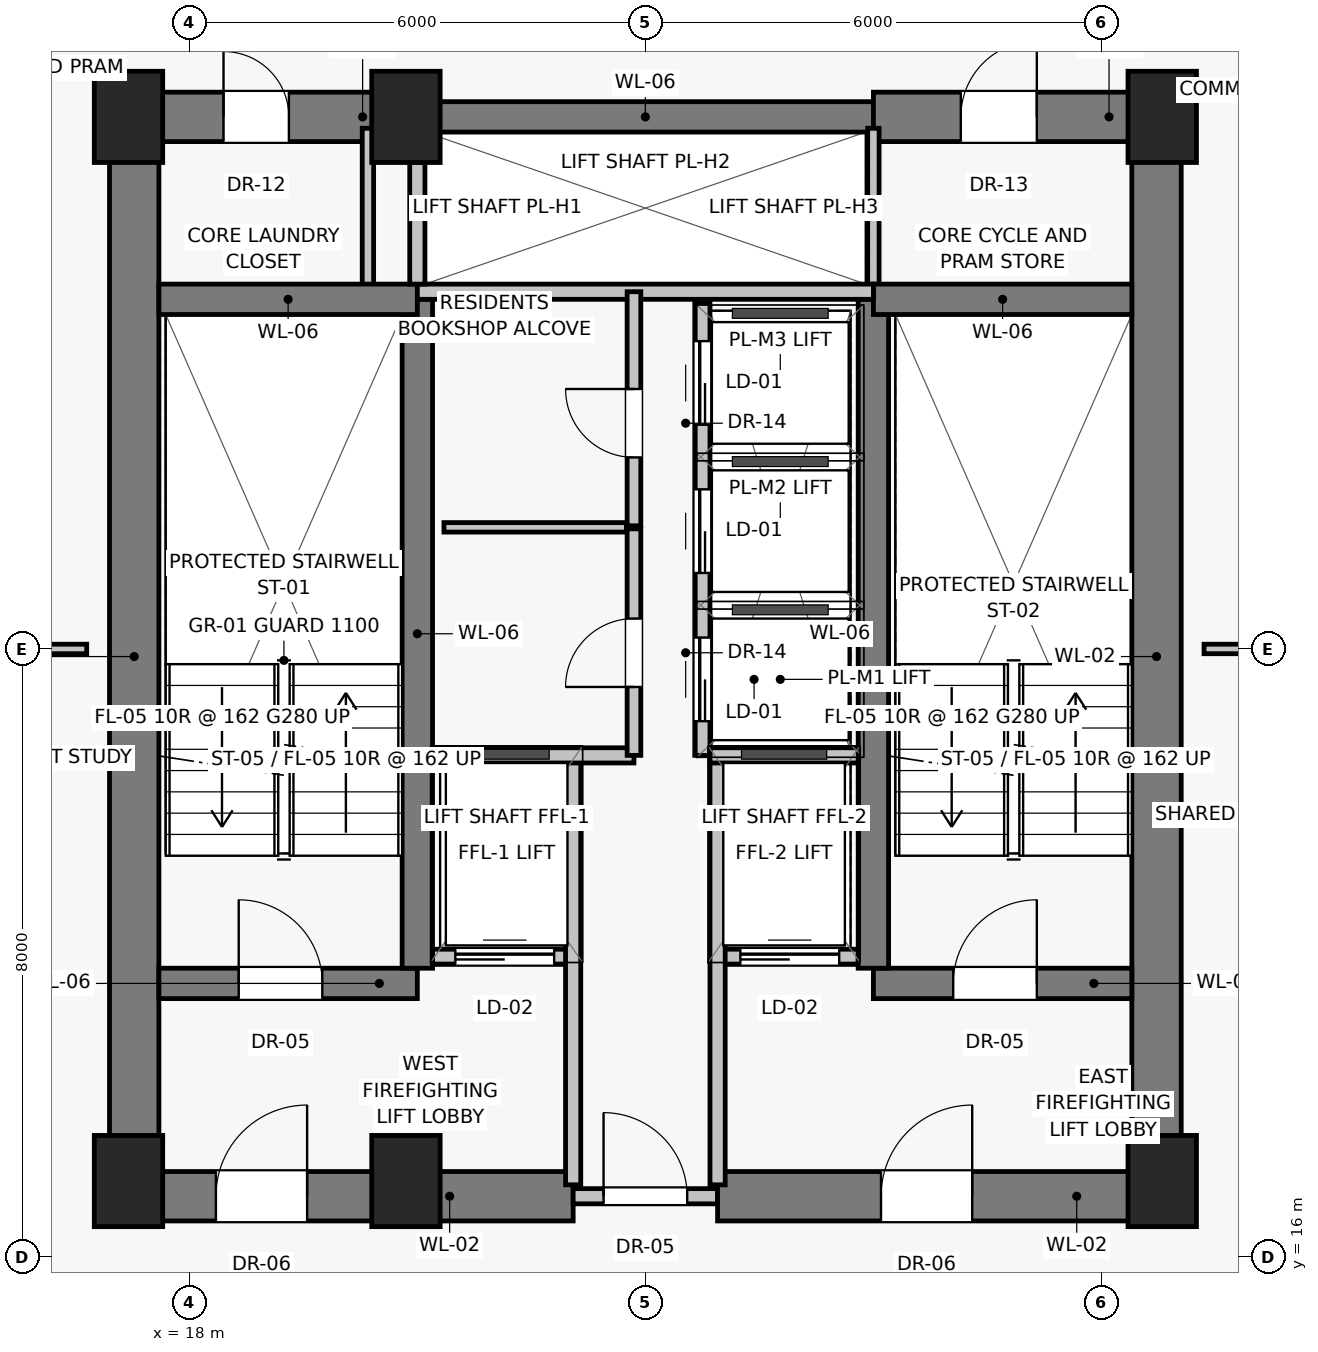
"""IFC4 building model, lengths in metres.
Left out: names, types, materials, properties, quantities, classifications, styles, units other than length and angle.
Written with IfcOpenShell. Run it as: python <this file> out.ifc"""

import sys

from ifc_helpers import new_model, si_unit, direction, frame, frame_2d, origin, origin_2d, place, context, subcontext, project, spatial, rectangle, extrude, source, transform, mapped, element, fill, save


model = new_model("IFC4")
c1 = context("Model", 3, precision=1e-05, world=origin(), true_north=direction((0.0, 1.0)))
c2 = subcontext(c1, "Body", "Model", "MODEL_VIEW")
j1 = project(units=[si_unit("LENGTHUNIT", "METRE"), si_unit("PLANEANGLEUNIT", "RADIAN")], contexts=[c1])
p1 = place(None, origin())
s1 = spatial("IfcSite", under=j1, at=p1, CompositionType="ELEMENT")
p2 = place(p1, origin())
s2 = spatial("IfcBuilding", under=s1, at=p2, CompositionType="ELEMENT")
p3 = place(p2, frame((0.0, 0.0, 132.75)))
s3 = spatial("IfcBuildingStorey", under=s2, at=p3, CompositionType="ELEMENT", Elevation=132.75)
for number, where, z_axis, x_axis in (
    (1, (17.2, 17.0, 0.0), (0.0, 0.0, 1.0), (1.0, 0.0, 0.0)),
    (2, (20.85, 17.0, 0.0), (0.0, 0.0, 1.0), (1.0, 0.0, 0.0)),
    (3, (30.8, 17.0, 0.0), (0.0, 0.0, 1.0), (1.0, 0.0, 0.0)),
    (4, (17.2, 31.0, 0.0), (0.0, 0.0, 1.0), (1.0, 0.0, 0.0)),
    (5, (20.85, 31.0, 0.0), (0.0, 0.0, 1.0), (1.0, 0.0, 0.0)),
    (6, (30.8, 31.0, 0.0), (0.0, 0.0, 1.0), (1.0, 0.0, 0.0)),
):
    element("IfcColumn", number, at=place(p3, frame(where, z_axis=z_axis, x_axis=x_axis)), inside=s3, PredefinedType="PILASTER", context=c2, shape_type="SweptSolid", body=[
        extrude(rectangle(XDim=0.9, YDim=1.2, at=origin_2d()), origin(), (0.0, 0.0, 1.0), 3.25),
    ])
for number, where, z_axis, x_axis in (
    (7, (17.275, 16.8, 0.0), (0.0, 0.0, 1.0), (0.0, 1.0, 0.0)),
    (8, (30.725, 16.8, 0.0), (0.0, 0.0, 1.0), (0.0, 1.0, 0.0)),
):
    element("IfcWall", number, at=place(p3, frame(where, z_axis=z_axis, x_axis=x_axis)), inside=s3, PredefinedType="SHEAR", context=c2, shape_type="SweptSolid", body=[
        extrude(rectangle(XDim=14.2, YDim=0.65, at=frame_2d((7.1, 0.0))), origin(), (0.0, 0.0, 1.0), 3.0),
    ])
p4 = place(p3, frame((17.2, 16.8, 0.0), z_axis=(0.0, 0.0, 1.0), x_axis=(1.0, 0.0, 0.0)))
e9 = element("IfcWall", 9, at=p4, inside=s3, PredefinedType="SHEAR", context=c2, shape_type="SweptSolid", body=[
    extrude(rectangle(XDim=5.85, YDim=0.65, at=frame_2d((2.925, 0.0))), origin(), (0.0, 0.0, 1.0), 3.0),
])
p5 = place(p4, frame((1.15, 0.0, 0.0)))
e10 = element("IfcOpeningElement", 10, at=p5, cuts=e9, PredefinedType="OPENING", context=c2, shape_type="SweptSolid", body=[
    extrude(rectangle(XDim=1.2, YDim=2.03, at=frame_2d((0.6, 1.015))), frame((0.0, 0.335, 0.0), z_axis=(0.0, -1.0, 0.0), x_axis=(1.0, 0.0, 0.0)), (0.0, 0.0, 1.0), 0.67),
])
p6 = place(p3, frame((23.05, 16.8, 0.0), z_axis=(0.0, 0.0, 1.0), x_axis=(1.0, 0.0, 0.0)))
e11 = element("IfcWall", 11, at=p6, inside=s3, PredefinedType="SOLIDWALL", context=c2, shape_type="SweptSolid", body=[
    extrude(rectangle(XDim=1.9, YDim=0.2, at=frame_2d((0.95, 0.0))), origin(), (0.0, 0.0, 1.0), 2.15),
])
p7 = place(p6, frame((0.4, 0.0, 0.0)))
e12 = element("IfcOpeningElement", 12, at=p7, cuts=e11, PredefinedType="OPENING", context=c2, shape_type="SweptSolid", body=[
    extrude(rectangle(XDim=1.1, YDim=2.03, at=frame_2d((0.55, 1.015))), frame((0.0, 0.11, 0.0), z_axis=(0.0, -1.0, 0.0), x_axis=(1.0, 0.0, 0.0)), (0.0, 0.0, 1.0), 0.22),
])
p8 = place(p3, frame((24.95, 16.8, 0.0), z_axis=(0.0, 0.0, 1.0), x_axis=(1.0, 0.0, 0.0)))
e13 = element("IfcWall", 13, at=p8, inside=s3, PredefinedType="SHEAR", context=c2, shape_type="SweptSolid", body=[
    extrude(rectangle(XDim=5.85, YDim=0.65, at=frame_2d((2.925, 0.0))), origin(), (0.0, 0.0, 1.0), 3.0),
])
p9 = place(p8, frame((2.15, 0.0, 0.0)))
e14 = element("IfcOpeningElement", 14, at=p9, cuts=e13, PredefinedType="OPENING", context=c2, shape_type="SweptSolid", body=[
    extrude(rectangle(XDim=1.2, YDim=2.03, at=frame_2d((0.6, 1.015))), frame((0.0, 0.335, 0.0), z_axis=(0.0, -1.0, 0.0), x_axis=(1.0, 0.0, 0.0)), (0.0, 0.0, 1.0), 0.67),
])
p10 = place(p3, frame((17.2, 31.0, 0.0), z_axis=(0.0, 0.0, 1.0), x_axis=(1.0, 0.0, 0.0)))
e15 = element("IfcWall", 15, at=p10, inside=s3, PredefinedType="SHEAR", context=c2, shape_type="SweptSolid", body=[
    extrude(rectangle(XDim=3.8, YDim=0.65, at=frame_2d((1.9, 0.0))), origin(), (0.0, 0.0, 1.0), 3.0),
])
p11 = place(p10, frame((1.25, 0.0, 0.0)))
e16 = element("IfcOpeningElement", 16, at=p11, cuts=e15, PredefinedType="OPENING", context=c2, shape_type="SweptSolid", body=[
    extrude(rectangle(XDim=0.86, YDim=2.01, at=frame_2d((0.43, 1.005))), frame((0.0, 0.335, 0.0), z_axis=(0.0, -1.0, 0.0), x_axis=(1.0, 0.0, 0.0)), (0.0, 0.0, 1.0), 0.67),
])
p12 = place(p3, frame((21.0, 31.0, 0.0), z_axis=(0.0, 0.0, 1.0), x_axis=(1.0, 0.0, 0.0)))
e17 = element("IfcWall", 17, at=p12, inside=s3, PredefinedType="SHEAR", context=c2, shape_type="SweptSolid", body=[
    extrude(rectangle(XDim=6.0, YDim=0.4, at=frame_2d((3.0, 0.0))), origin(), (0.0, 0.0, 1.0), 3.0),
])
p13 = place(p3, frame((27.0, 31.0, 0.0), z_axis=(0.0, 0.0, 1.0), x_axis=(1.0, 0.0, 0.0)))
e18 = element("IfcWall", 18, at=p13, inside=s3, PredefinedType="SHEAR", context=c2, shape_type="SweptSolid", body=[
    extrude(rectangle(XDim=3.8, YDim=0.65, at=frame_2d((1.9, 0.0))), origin(), (0.0, 0.0, 1.0), 3.0),
])
p14 = place(p13, frame((1.15, 0.0, 0.0)))
e19 = element("IfcOpeningElement", 19, at=p14, cuts=e18, PredefinedType="OPENING", context=c2, shape_type="SweptSolid", body=[
    extrude(rectangle(XDim=1.0, YDim=2.01, at=frame_2d((0.5, 1.005))), frame((0.0, 0.335, 0.0), z_axis=(0.0, -1.0, 0.0), x_axis=(1.0, 0.0, 0.0)), (0.0, 0.0, 1.0), 0.67),
])
for number, where, z_axis, x_axis in (
    (20, (20.35, 28.65, 0.0), (0.0, 0.0, 1.0), (0.0, 1.0, 0.0)),
    (21, (27.0, 28.65, 0.0), (0.0, 0.0, 1.0), (0.0, 1.0, 0.0)),
):
    element("IfcWall", number, at=place(p3, frame(where, z_axis=z_axis, x_axis=x_axis)), inside=s3, PredefinedType="PARTITIONING", context=c2, shape_type="SweptSolid", body=[
        extrude(rectangle(XDim=2.2, YDim=0.15, at=frame_2d((1.1, 0.0))), origin(), (0.0, 0.0, 1.0), 3.0),
    ])
p15 = place(p3, frame((17.6, 19.6, 0.0), z_axis=(0.0, 0.0, 1.0), x_axis=(1.0, 0.0, 0.0)))
e22 = element("IfcWall", 22, at=p15, inside=s3, PredefinedType="SHEAR", context=c2, shape_type="SweptSolid", body=[
    extrude(rectangle(XDim=3.4, YDim=0.4, at=frame_2d((1.7, 0.0))), origin(), (0.0, 0.0, 1.0), 3.0),
])
p16 = place(p15, frame((1.05, 0.0, 0.0)))
e23 = element("IfcOpeningElement", 23, at=p16, cuts=e22, PredefinedType="OPENING", context=c2, shape_type="SweptSolid", body=[
    extrude(rectangle(XDim=1.1, YDim=2.03, at=frame_2d((0.55, 1.015))), frame((0.0, 0.21, 0.0), z_axis=(0.0, -1.0, 0.0), x_axis=(1.0, 0.0, 0.0)), (0.0, 0.0, 1.0), 0.42),
])
p17 = place(p3, frame((21.2, 19.95, 0.0), z_axis=(0.0, 0.0, 1.0), x_axis=(1.0, 0.0, 0.0)))
e24 = element("IfcWall", 24, at=p17, inside=s3, PredefinedType="SOLIDWALL", context=c2, shape_type="SweptSolid", body=[
    extrude(rectangle(XDim=1.85, YDim=0.2, at=frame_2d((0.925, 0.0))), origin(), (0.0, 0.0, 1.0), 3.0),
])
p18 = place(p17, frame((0.3, 0.0, 0.0)))
e25 = element("IfcOpeningElement", 25, at=p18, cuts=e24, PredefinedType="OPENING", context=c2, shape_type="SweptSolid", body=[
    extrude(rectangle(XDim=1.3, YDim=2.25, at=frame_2d((0.65, 1.125))), frame((0.0, 0.11, 0.0), z_axis=(0.0, -1.0, 0.0), x_axis=(1.0, 0.0, 0.0)), (0.0, 0.0, 1.0), 0.22),
])
p19 = place(p3, frame((24.95, 19.95, 0.0), z_axis=(0.0, 0.0, 1.0), x_axis=(1.0, 0.0, 0.0)))
e26 = element("IfcWall", 26, at=p19, inside=s3, PredefinedType="SOLIDWALL", context=c2, shape_type="SweptSolid", body=[
    extrude(rectangle(XDim=1.85, YDim=0.2, at=frame_2d((0.925, 0.0))), origin(), (0.0, 0.0, 1.0), 3.0),
])
p20 = place(p19, frame((0.3, 0.0, 0.0)))
e27 = element("IfcOpeningElement", 27, at=p20, cuts=e26, PredefinedType="OPENING", context=c2, shape_type="SweptSolid", body=[
    extrude(rectangle(XDim=1.3, YDim=2.25, at=frame_2d((0.65, 1.125))), frame((0.0, 0.11, 0.0), z_axis=(0.0, -1.0, 0.0), x_axis=(1.0, 0.0, 0.0)), (0.0, 0.0, 1.0), 0.22),
])
p21 = place(p3, frame((27.0, 19.6, 0.0), z_axis=(0.0, 0.0, 1.0), x_axis=(1.0, 0.0, 0.0)))
e28 = element("IfcWall", 28, at=p21, inside=s3, PredefinedType="SHEAR", context=c2, shape_type="SweptSolid", body=[
    extrude(rectangle(XDim=3.4, YDim=0.4, at=frame_2d((1.7, 0.0))), origin(), (0.0, 0.0, 1.0), 3.0),
])
p22 = place(p21, frame((1.05, 0.0, 0.0)))
e29 = element("IfcOpeningElement", 29, at=p22, cuts=e28, PredefinedType="OPENING", context=c2, shape_type="SweptSolid", body=[
    extrude(rectangle(XDim=1.1, YDim=2.03, at=frame_2d((0.55, 1.015))), frame((0.0, 0.21, 0.0), z_axis=(0.0, -1.0, 0.0), x_axis=(1.0, 0.0, 0.0)), (0.0, 0.0, 1.0), 0.42),
])
for number, where, z_axis, x_axis in (
    (30, (21.0, 19.8, 0.0), (0.0, 0.0, 1.0), (0.0, 1.0, 0.0)),
    (31, (27.0, 19.8, 0.0), (0.0, 0.0, 1.0), (0.0, 1.0, 0.0)),
):
    element("IfcWall", number, at=place(p3, frame(where, z_axis=z_axis, x_axis=x_axis)), inside=s3, PredefinedType="SHEAR", context=c2, shape_type="SweptSolid", body=[
        extrude(rectangle(XDim=8.8, YDim=0.4, at=frame_2d((4.4, 0.0))), origin(), (0.0, 0.0, 1.0), 3.0),
    ])
for number, where, z_axis, x_axis in (
    (32, (17.6, 28.6, 0.0), (0.0, 0.0, 1.0), (1.0, 0.0, 0.0)),
    (33, (27.0, 28.6, 0.0), (0.0, 0.0, 1.0), (1.0, 0.0, 0.0)),
):
    element("IfcWall", number, at=place(p3, frame(where, z_axis=z_axis, x_axis=x_axis)), inside=s3, PredefinedType="SHEAR", context=c2, shape_type="SweptSolid", body=[
        extrude(rectangle(XDim=3.4, YDim=0.4, at=frame_2d((1.7, 0.0))), origin(), (0.0, 0.0, 1.0), 3.0),
    ])
for number, where, z_axis, x_axis in (
    (34, (23.05, 16.95, 0.0), (0.0, 0.0, 1.0), (0.0, 1.0, 0.0)),
    (35, (24.95, 16.95, 0.0), (0.0, 0.0, 1.0), (0.0, 1.0, 0.0)),
):
    element("IfcWall", number, at=place(p3, frame(where, z_axis=z_axis, x_axis=x_axis)), inside=s3, PredefinedType="SOLIDWALL", context=c2, shape_type="SweptSolid", body=[
        extrude(rectangle(XDim=5.6, YDim=0.2, at=frame_2d((2.8, 0.0))), origin(), (0.0, 0.0, 1.0), 3.0),
    ])
p23 = place(p3, frame((21.2, 22.6, 0.0), z_axis=(0.0, 0.0, 1.0), x_axis=(1.0, 0.0, 0.0)))
e36 = element("IfcWall", 36, at=p23, inside=s3, PredefinedType="SOLIDWALL", context=c2, shape_type="SweptSolid", body=[
    extrude(rectangle(XDim=2.65, YDim=0.2, at=frame_2d((1.325, 0.0))), origin(), (0.0, 0.0, 1.0), 3.0),
])
p24 = place(p3, frame((24.85, 22.6, 0.0), z_axis=(0.0, 0.0, 1.0), x_axis=(1.0, 0.0, 0.0)))
e37 = element("IfcWall", 37, at=p24, inside=s3, PredefinedType="SOLIDWALL", context=c2, shape_type="SweptSolid", body=[
    extrude(rectangle(XDim=1.95, YDim=0.2, at=frame_2d((0.975, 0.0))), origin(), (0.0, 0.0, 1.0), 3.0),
])
p25 = place(p3, frame((21.0, 28.7, 0.0), z_axis=(0.0, 0.0, 1.0), x_axis=(1.0, 0.0, 0.0)))
e38 = element("IfcWall", 38, at=p25, inside=s3, PredefinedType="SOLIDWALL", context=c2, shape_type="SweptSolid", body=[
    extrude(rectangle(XDim=6.0, YDim=0.2, at=frame_2d((3.0, 0.0))), origin(), (0.0, 0.0, 1.0), 3.0),
])
p26 = place(p3, frame((21.0, 28.8, 0.0), z_axis=(0.0, 0.0, 1.0), x_axis=(0.0, 1.0, 0.0)))
e39 = element("IfcWall", 39, at=p26, inside=s3, PredefinedType="SOLIDWALL", context=c2, shape_type="SweptSolid", body=[
    extrude(rectangle(XDim=1.6, YDim=0.2, at=frame_2d((0.8, 0.0))), origin(), (0.0, 0.0, 1.0), 3.0),
])
p27 = place(p3, frame((23.85, 22.6, 0.0), z_axis=(0.0, 0.0, 1.0), x_axis=(0.0, 1.0, 0.0)))
e40 = element("IfcWall", 40, at=p27, inside=s3, PredefinedType="PARTITIONING", context=c2, shape_type="SweptSolid", body=[
    extrude(rectangle(XDim=2.98, YDim=0.18, at=frame_2d((1.49, 0.0))), origin(), (0.0, 0.0, 1.0), 3.0),
])
p28 = place(p27, frame((0.9, 0.0, 0.0)))
e41 = element("IfcOpeningElement", 41, at=p28, cuts=e40, PredefinedType="OPENING", context=c2, shape_type="SweptSolid", body=[
    extrude(rectangle(XDim=0.9, YDim=2.01, at=frame_2d((0.45, 1.005))), frame((0.0, 0.1, 0.0), z_axis=(0.0, -1.0, 0.0), x_axis=(1.0, 0.0, 0.0)), (0.0, 0.0, 1.0), 0.2),
])
p29 = place(p3, frame((23.85, 25.62, 0.0), z_axis=(0.0, 0.0, 1.0), x_axis=(0.0, 1.0, 0.0)))
e42 = element("IfcWall", 42, at=p29, inside=s3, PredefinedType="PARTITIONING", context=c2, shape_type="SweptSolid", body=[
    extrude(rectangle(XDim=3.08, YDim=0.18, at=frame_2d((1.54, 0.0))), origin(), (0.0, 0.0, 1.0), 3.0),
])
p30 = place(p29, frame((0.9, 0.0, 0.0)))
e43 = element("IfcOpeningElement", 43, at=p30, cuts=e42, PredefinedType="OPENING", context=c2, shape_type="SweptSolid", body=[
    extrude(rectangle(XDim=0.9, YDim=2.01, at=frame_2d((0.45, 1.005))), frame((0.0, 0.1, 0.0), z_axis=(0.0, -1.0, 0.0), x_axis=(1.0, 0.0, 0.0)), (0.0, 0.0, 1.0), 0.2),
])
p31 = place(p3, frame((24.75, 22.6, 0.0), z_axis=(0.0, 0.0, 1.0), x_axis=(0.0, 1.0, 0.0)))
e44 = element("IfcWall", 44, at=p31, inside=s3, PredefinedType="SOLIDWALL", context=c2, shape_type="SweptSolid", body=[
    extrude(rectangle(XDim=5.95, YDim=0.2, at=frame_2d((2.975, 0.0))), origin(), (0.0, 0.0, 1.0), 3.0),
])
p32 = place(p31, frame((0.45, 0.0, 0.0)))
e45 = element("IfcOpeningElement", 45, at=p32, cuts=e44, PredefinedType="OPENING", context=c2, shape_type="SweptSolid", body=[
    extrude(rectangle(XDim=1.1, YDim=2.08, at=frame_2d((0.55, 1.04))), frame((0.0, 0.11, 0.0), z_axis=(0.0, -1.0, 0.0), x_axis=(1.0, 0.0, 0.0)), (0.0, 0.0, 1.0), 0.22),
])
p33 = place(p31, frame((2.4, 0.0, 0.0)))
e46 = element("IfcOpeningElement", 46, at=p33, cuts=e44, PredefinedType="OPENING", context=c2, shape_type="SweptSolid", body=[
    extrude(rectangle(XDim=1.1, YDim=2.08, at=frame_2d((0.55, 1.04))), frame((0.0, 0.11, 0.0), z_axis=(0.0, -1.0, 0.0), x_axis=(1.0, 0.0, 0.0)), (0.0, 0.0, 1.0), 0.22),
])
p34 = place(p31, frame((4.35, 0.0, 0.0)))
e47 = element("IfcOpeningElement", 47, at=p34, cuts=e44, PredefinedType="OPENING", context=c2, shape_type="SweptSolid", body=[
    extrude(rectangle(XDim=1.1, YDim=2.08, at=frame_2d((0.55, 1.04))), frame((0.0, 0.11, 0.0), z_axis=(0.0, -1.0, 0.0), x_axis=(1.0, 0.0, 0.0)), (0.0, 0.0, 1.0), 0.22),
])
p35 = place(p3, frame((21.35, 25.6, 0.0), z_axis=(0.0, 0.0, 1.0), x_axis=(1.0, 0.0, 0.0)))
e48 = element("IfcWall", 48, at=p35, inside=s3, PredefinedType="PARTITIONING", context=c2, shape_type="SweptSolid", body=[
    extrude(rectangle(XDim=2.4, YDim=0.125, at=frame_2d((1.2, 0.0))), origin(), (0.0, 0.0, 1.0), 3.0),
])
for number, where, z_axis, x_axis in (
    (49, (14.55, 24.0, 0.0), (0.0, 0.0, 1.0), (1.0, 0.0, 0.0)),
    (50, (31.35, 24.0, 0.0), (0.0, 0.0, 1.0), (1.0, 0.0, 0.0)),
):
    element("IfcWall", number, at=place(p3, frame(where, z_axis=z_axis, x_axis=x_axis)), inside=s3, PredefinedType="PARTITIONING", context=c2, shape_type="SweptSolid", body=[
        extrude(rectangle(XDim=2.1, YDim=0.125, at=frame_2d((1.05, 0.0))), origin(), (0.0, 0.0, 1.0), 3.0),
    ])
m1 = source(origin(), c2, "Body", "SweptSolid", [
    extrude(rectangle(XDim=1.2, YDim=2.03, at=frame_2d((0.6, 1.015))), frame((0.0, 0.025, 0.0), z_axis=(0.0, -1.0, 0.0), x_axis=(1.0, 0.0, 0.0)), (0.0, 0.0, 1.0), 0.05),
])
p36 = place(p5, origin())
e51 = element("IfcDoor", 51, at=p36, inside=s3, OperationType="SINGLE_SWING_RIGHT", PredefinedType="DOOR", context=c2, shape_type="MappedRepresentation", body=[
    mapped(m1, transform((0.0, 0.0, 0.0), scale=1.0)),
])
fill(e10, e51)
m2 = source(origin(), c2, "Body", "SweptSolid", [
    extrude(rectangle(XDim=1.1, YDim=2.03, at=frame_2d((0.55, 1.015))), frame((0.0, 0.025, 0.0), z_axis=(0.0, -1.0, 0.0), x_axis=(1.0, 0.0, 0.0)), (0.0, 0.0, 1.0), 0.05),
])
p37 = place(p7, origin())
e52 = element("IfcDoor", 52, at=p37, inside=s3, OperationType="SINGLE_SWING_LEFT", PredefinedType="DOOR", context=c2, shape_type="MappedRepresentation", body=[
    mapped(m2, transform((0.0, 0.0, 0.0), scale=1.0)),
])
fill(e12, e52)
p38 = place(p9, origin())
e53 = element("IfcDoor", 53, at=p38, inside=s3, OperationType="SINGLE_SWING_RIGHT", PredefinedType="DOOR", context=c2, shape_type="MappedRepresentation", body=[
    mapped(m1, transform((0.0, 0.0, 0.0), scale=1.0)),
])
fill(e14, e53)
m3 = source(origin(), c2, "Body", "SweptSolid", [
    extrude(rectangle(XDim=0.86, YDim=2.01, at=frame_2d((0.43, 1.005))), frame((0.0, 0.025, 0.0), z_axis=(0.0, -1.0, 0.0), x_axis=(1.0, 0.0, 0.0)), (0.0, 0.0, 1.0), 0.05),
])
p39 = place(p11, origin())
e54 = element("IfcDoor", 54, at=p39, inside=s3, OperationType="SINGLE_SWING_LEFT", PredefinedType="DOOR", context=c2, shape_type="MappedRepresentation", body=[
    mapped(m3, transform((0.0, 0.0, 0.0), scale=1.0)),
])
fill(e16, e54)
m4 = source(origin(), c2, "Body", "SweptSolid", [
    extrude(rectangle(XDim=1.0, YDim=2.01, at=frame_2d((0.5, 1.005))), frame((0.0, 0.025, 0.0), z_axis=(0.0, -1.0, 0.0), x_axis=(1.0, 0.0, 0.0)), (0.0, 0.0, 1.0), 0.05),
])
p40 = place(p14, origin())
e55 = element("IfcDoor", 55, at=p40, inside=s3, OperationType="SINGLE_SWING_RIGHT", PredefinedType="DOOR", context=c2, shape_type="MappedRepresentation", body=[
    mapped(m4, transform((0.0, 0.0, 0.0), scale=1.0)),
])
fill(e19, e55)
p41 = place(p16, origin())
e56 = element("IfcDoor", 56, at=p41, inside=s3, OperationType="SINGLE_SWING_LEFT", PredefinedType="DOOR", context=c2, shape_type="MappedRepresentation", body=[
    mapped(m2, transform((0.0, 0.0, 0.0), scale=1.0)),
])
fill(e23, e56)
m5 = source(origin(), c2, "Body", "SweptSolid", [
    extrude(rectangle(XDim=1.3, YDim=2.25, at=frame_2d((0.65, 1.125))), frame((0.0, 0.025, 0.0), z_axis=(0.0, -1.0, 0.0), x_axis=(1.0, 0.0, 0.0)), (0.0, 0.0, 1.0), 0.05),
])
p42 = place(p18, origin())
e57 = element("IfcDoor", 57, at=p42, inside=s3, OperationType="SLIDING_TO_LEFT", PredefinedType="DOOR", context=c2, shape_type="MappedRepresentation", body=[
    mapped(m5, transform((0.0, 0.0, 0.0), scale=1.0)),
])
fill(e25, e57)
p43 = place(p20, origin())
e58 = element("IfcDoor", 58, at=p43, inside=s3, OperationType="SLIDING_TO_LEFT", PredefinedType="DOOR", context=c2, shape_type="MappedRepresentation", body=[
    mapped(m5, transform((0.0, 0.0, 0.0), scale=1.0)),
])
fill(e27, e58)
p44 = place(p22, origin())
e59 = element("IfcDoor", 59, at=p44, inside=s3, OperationType="SINGLE_SWING_RIGHT", PredefinedType="DOOR", context=c2, shape_type="MappedRepresentation", body=[
    mapped(m2, transform((0.0, 0.0, 0.0), scale=1.0)),
])
fill(e29, e59)
m6 = source(origin(), c2, "Body", "SweptSolid", [
    extrude(rectangle(XDim=0.9, YDim=2.01, at=frame_2d((0.45, 1.005))), frame((0.0, 0.025, 0.0), z_axis=(0.0, -1.0, 0.0), x_axis=(1.0, 0.0, 0.0)), (0.0, 0.0, 1.0), 0.05),
])
p45 = place(p28, origin())
e60 = element("IfcDoor", 60, at=p45, inside=s3, OperationType="SINGLE_SWING_LEFT", PredefinedType="DOOR", context=c2, shape_type="MappedRepresentation", body=[
    mapped(m6, transform((0.0, 0.0, 0.0), scale=1.0)),
])
fill(e41, e60)
p46 = place(p30, origin())
e61 = element("IfcDoor", 61, at=p46, inside=s3, OperationType="SINGLE_SWING_RIGHT", PredefinedType="DOOR", context=c2, shape_type="MappedRepresentation", body=[
    mapped(m6, transform((0.0, 0.0, 0.0), scale=1.0)),
])
fill(e43, e61)
m7 = source(origin(), c2, "Body", "SweptSolid", [
    extrude(rectangle(XDim=1.1, YDim=2.08, at=frame_2d((0.55, 1.04))), frame((0.0, 0.025, 0.0), z_axis=(0.0, -1.0, 0.0), x_axis=(1.0, 0.0, 0.0)), (0.0, 0.0, 1.0), 0.05),
])
p47 = place(p32, origin())
e62 = element("IfcDoor", 62, at=p47, inside=s3, OperationType="SLIDING_TO_LEFT", PredefinedType="DOOR", context=c2, shape_type="MappedRepresentation", body=[
    mapped(m7, transform((0.0, 0.0, 0.0), scale=1.0)),
])
fill(e45, e62)
p48 = place(p33, origin())
e63 = element("IfcDoor", 63, at=p48, inside=s3, OperationType="SLIDING_TO_LEFT", PredefinedType="DOOR", context=c2, shape_type="MappedRepresentation", body=[
    mapped(m7, transform((0.0, 0.0, 0.0), scale=1.0)),
])
fill(e46, e63)
p49 = place(p34, origin())
e64 = element("IfcDoor", 64, at=p49, inside=s3, OperationType="SLIDING_TO_LEFT", PredefinedType="DOOR", context=c2, shape_type="MappedRepresentation", body=[
    mapped(m7, transform((0.0, 0.0, 0.0), scale=1.0)),
])
fill(e47, e64)
save(model, sys.argv[1])
